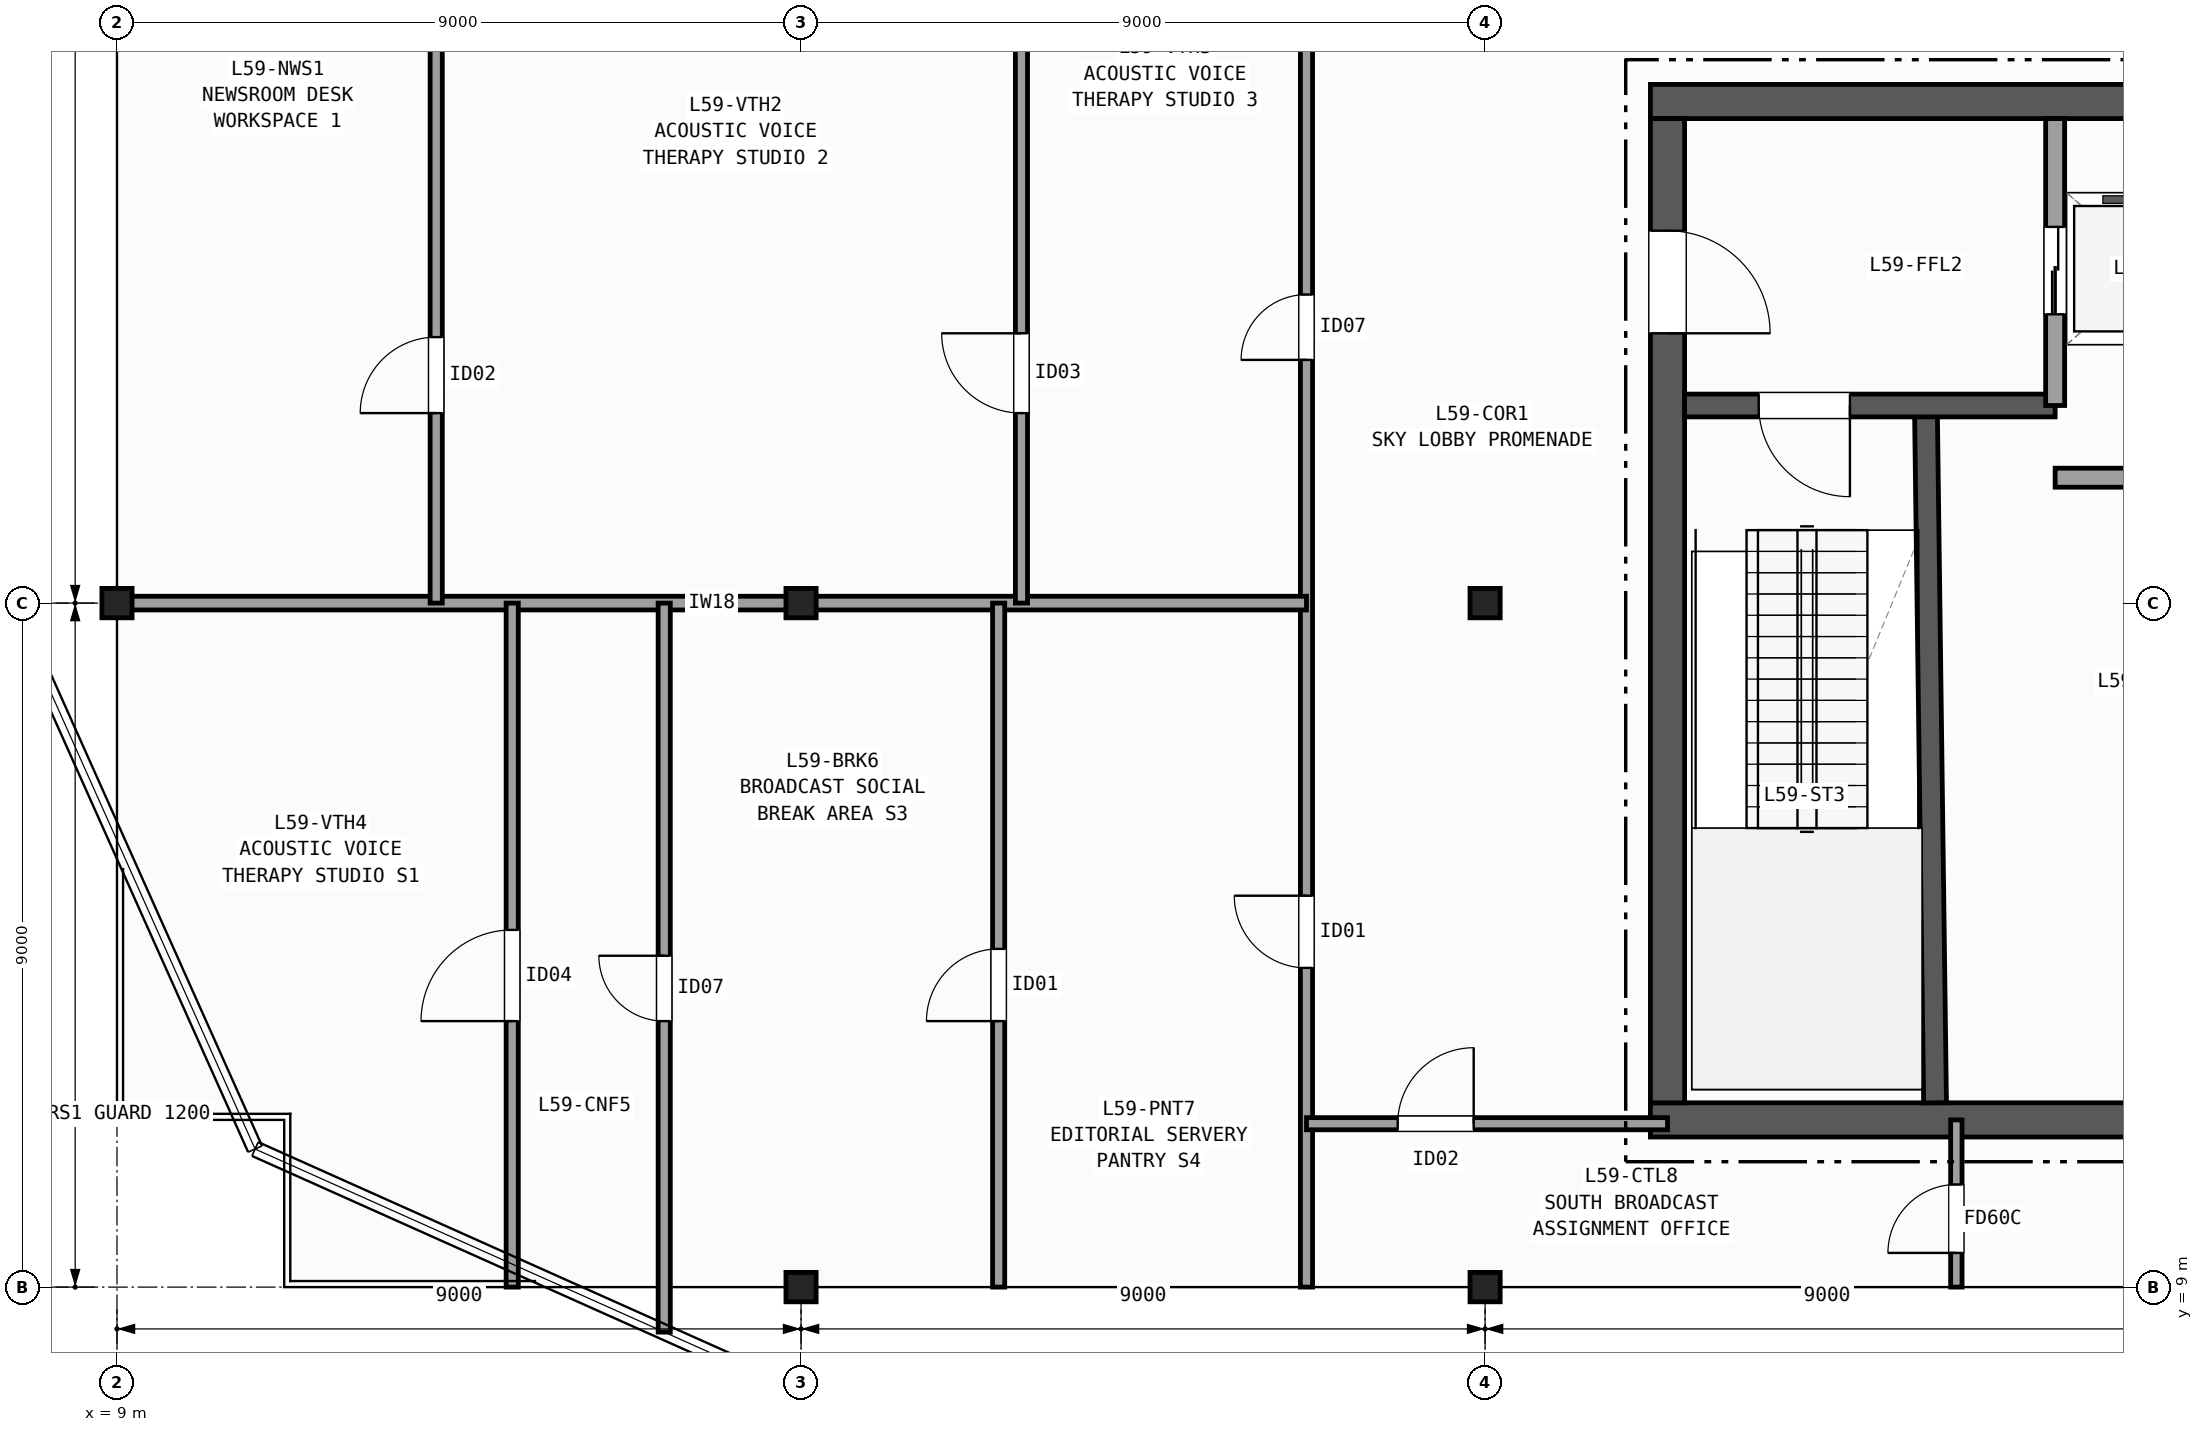
"""IFC4 building model, lengths in metres.
Left out: names, types, materials, properties, quantities, classifications, styles, units other than length and angle.
Written with IfcOpenShell. Run it as: python <this file> out.ifc"""

import sys

from ifc_helpers import new_model, si_unit, direction, frame, frame_2d, origin, origin_2d, place, context, subcontext, project, spatial, rectangle, i_section, extrude, element, fill, save


model = new_model("IFC4")
c1 = context("Model", 3, precision=1e-05, world=origin(), true_north=direction((0.0, 1.0)))
c2 = subcontext(c1, "Body", "Model", "MODEL_VIEW")
j1 = project(units=[si_unit("LENGTHUNIT", "METRE"), si_unit("PLANEANGLEUNIT", "RADIAN")], contexts=[c1])
p1 = place(None, origin())
s1 = spatial("IfcSite", under=j1, at=p1, CompositionType="ELEMENT")
p2 = place(p1, origin())
s2 = spatial("IfcBuilding", under=s1, at=p2, CompositionType="ELEMENT")
p3 = place(p2, frame((0.0, 0.0, 235.8)))
s3 = spatial("IfcBuildingStorey", under=s2, at=p3, CompositionType="ELEMENT", Elevation=235.8)
for number, where, z_axis, x_axis in (
    (1, (9.0, 18.0, 0.0), (0.0, 0.0, 1.0), (1.0, 0.0, 0.0)),
    (2, (18.0, 9.0, 0.0), (0.0, 0.0, 1.0), (1.0, 0.0, 0.0)),
    (3, (18.0, 18.0, 0.0), (0.0, 0.0, 1.0), (1.0, 0.0, 0.0)),
    (4, (27.0, 9.0, 0.0), (0.0, 0.0, 1.0), (1.0, 0.0, 0.0)),
    (5, (27.0, 18.0, 0.0), (0.0, 0.0, 1.0), (1.0, 0.0, 0.0)),
):
    element("IfcColumn", number, at=place(p3, frame(where, z_axis=z_axis, x_axis=x_axis)), inside=s3, PredefinedType="COLUMN", context=c2, shape_type="SweptSolid", body=[
        extrude(i_section(OverallWidth=0.397, OverallDepth=0.387, WebThickness=0.021, FlangeThickness=0.033, FilletRadius=0.015, at=origin_2d()), origin(), (0.0, 0.0, 1.0), 5.0),
    ])
p4 = place(p3, frame((29.175, 11.2, 0.0), z_axis=(0.0, 0.0, 1.0), x_axis=(1.0, 0.0, 0.0)))
e6 = element("IfcWall", 6, at=p4, inside=s3, PredefinedType="SHEAR", context=c2, shape_type="SweptSolid", body=[
    extrude(rectangle(XDim=13.85, YDim=0.45, at=frame_2d((6.925, 0.0))), origin(), (0.0, 0.0, 1.0), 4.72),
])
p5 = place(p3, frame((43.025, 24.6, 0.0), z_axis=(0.0, 0.0, 1.0), x_axis=(-1.0, 0.0, 0.0)))
e7 = element("IfcWall", 7, at=p5, inside=s3, PredefinedType="SHEAR", context=c2, shape_type="SweptSolid", body=[
    extrude(rectangle(XDim=13.85, YDim=0.45, at=frame_2d((6.925, 0.0))), origin(), (0.0, 0.0, 1.0), 4.72),
])
p6 = place(p5, frame((0.725, 0.0, 0.0)))
e8 = element("IfcOpeningElement", 8, at=p6, cuts=e7, PredefinedType="OPENING", context=c2, shape_type="SweptSolid", body=[
    extrude(rectangle(XDim=1.1, YDim=2.15, at=frame_2d((0.55, 1.075))), frame((0.0, 0.235, 0.0), z_axis=(0.0, -1.0, 0.0), x_axis=(1.0, 0.0, 0.0)), (0.0, 0.0, 1.0), 0.47),
])
p7 = place(p5, frame((2.675, 0.0, 0.0)))
e9 = element("IfcOpeningElement", 9, at=p7, cuts=e7, PredefinedType="OPENING", context=c2, shape_type="SweptSolid", body=[
    extrude(rectangle(XDim=0.9, YDim=2.1, at=frame_2d((0.45, 1.05))), frame((0.0, 0.235, 0.0), z_axis=(0.0, -1.0, 0.0), x_axis=(1.0, 0.0, 0.0)), (0.0, 0.0, 1.0), 0.47),
])
p8 = place(p5, frame((4.575, 0.0, 0.0)))
e10 = element("IfcOpeningElement", 10, at=p8, cuts=e7, PredefinedType="OPENING", context=c2, shape_type="SweptSolid", body=[
    extrude(rectangle(XDim=0.9, YDim=2.1, at=frame_2d((0.45, 1.05))), frame((0.0, 0.235, 0.0), z_axis=(0.0, -1.0, 0.0), x_axis=(1.0, 0.0, 0.0)), (0.0, 0.0, 1.0), 0.47),
])
p9 = place(p3, frame((29.4, 24.375, 0.0), z_axis=(0.0, 0.0, 1.0), x_axis=(0.0, -1.0, 0.0)))
e11 = element("IfcWall", 11, at=p9, inside=s3, PredefinedType="SHEAR", context=c2, shape_type="SweptSolid", body=[
    extrude(rectangle(XDim=12.95, YDim=0.45, at=frame_2d((6.475, 0.0))), origin(), (0.0, 0.0, 1.0), 4.72),
])
p10 = place(p9, frame((1.475, 0.0, 0.0)))
e12 = element("IfcOpeningElement", 12, at=p10, cuts=e11, PredefinedType="OPENING", context=c2, shape_type="SweptSolid", body=[
    extrude(rectangle(XDim=1.35, YDim=2.15, at=frame_2d((0.675, 1.075))), frame((0.0, 0.235, 0.0), z_axis=(0.0, -1.0, 0.0), x_axis=(1.0, 0.0, 0.0)), (0.0, 0.0, 1.0), 0.47),
])
p11 = place(p3, frame((32.92, 11.425, 0.0), z_axis=(0.0, 0.0, 1.0), x_axis=(-0.013135638869, 0.999913723774, 0.0)))
e13 = element("IfcWall", 13, at=p11, inside=s3, PredefinedType="SHEAR", context=c2, shape_type="SweptSolid", body=[
    extrude(rectangle(XDim=9.126, YDim=0.3, at=frame_2d((4.563, 0.0))), origin(), (0.0, 0.0, 1.0), 4.72),
])
p12 = place(p3, frame((34.5, 20.6, 0.0), z_axis=(0.0, 0.0, 1.0), x_axis=(-1.0, 0.0, 0.0)))
e14 = element("IfcWall", 14, at=p12, inside=s3, PredefinedType="SHEAR", context=c2, shape_type="SweptSolid", body=[
    extrude(rectangle(XDim=4.875, YDim=0.3, at=frame_2d((2.438, 0.0))), origin(), (0.0, 0.0, 1.0), 4.72),
])
p13 = place(p12, frame((2.7, 0.0, 0.0)))
e15 = element("IfcOpeningElement", 15, at=p13, cuts=e14, PredefinedType="OPENING", context=c2, shape_type="SweptSolid", body=[
    extrude(rectangle(XDim=1.2, YDim=2.15, at=frame_2d((0.6, 1.075))), frame((0.0, 0.16, 0.0), z_axis=(0.0, -1.0, 0.0), x_axis=(1.0, 0.0, 0.0)), (0.0, 0.0, 1.0), 0.32),
])
p14 = place(p3, frame((34.5, 20.6, 0.0), z_axis=(0.0, 0.0, 1.0), x_axis=(0.0, 1.0, 0.0)))
e16 = element("IfcWall", 16, at=p14, inside=s3, PredefinedType="PARTITIONING", context=c2, shape_type="SweptSolid", body=[
    extrude(rectangle(XDim=3.775, YDim=0.25, at=frame_2d((1.887, 0.0))), origin(), (0.0, 0.0, 1.0), 4.72),
])
p15 = place(p14, frame((1.2, 0.0, 0.0)))
e17 = element("IfcOpeningElement", 17, at=p15, cuts=e16, PredefinedType="OPENING", context=c2, shape_type="SweptSolid", body=[
    extrude(rectangle(XDim=1.15, YDim=2.15, at=frame_2d((0.575, 1.075))), frame((0.0, 0.135, 0.0), z_axis=(0.0, -1.0, 0.0), x_axis=(1.0, 0.0, 0.0)), (0.0, 0.0, 1.0), 0.27),
])
p16 = place(p3, frame((34.5, 19.65, 0.0), z_axis=(0.0, 0.0, 1.0), x_axis=(1.0, 0.0, 0.0)))
e18 = element("IfcWall", 18, at=p16, inside=s3, PredefinedType="PARTITIONING", context=c2, shape_type="SweptSolid", body=[
    extrude(rectangle(XDim=6.48, YDim=0.25, at=frame_2d((3.24, 0.0))), origin(), (0.0, 0.0, 1.0), 4.72),
])
p17 = place(p3, frame((24.65, 9.0, 0.0), z_axis=(0.0, 0.0, 1.0), x_axis=(0.0, 1.0, 0.0)))
e19 = element("IfcWall", 19, at=p17, inside=s3, PredefinedType="PARTITIONING", context=c2, shape_type="SweptSolid", body=[
    extrude(rectangle(XDim=19.2, YDim=0.16, at=frame_2d((9.6, 0.0))), origin(), (0.0, 0.0, 1.0), 4.007),
])
p18 = place(p17, frame((12.2, 0.0, 0.0)))
e20 = element("IfcOpeningElement", 20, at=p18, cuts=e19, PredefinedType="OPENING", context=c2, shape_type="SweptSolid", body=[
    extrude(rectangle(XDim=0.86, YDim=2.05, at=frame_2d((0.43, 1.025))), frame((0.0, 0.09, 0.0), z_axis=(0.0, -1.0, 0.0), x_axis=(1.0, 0.0, 0.0)), (0.0, 0.0, 1.0), 0.18),
])
p19 = place(p17, frame((4.2, 0.0, 0.0)))
e21 = element("IfcOpeningElement", 21, at=p19, cuts=e19, PredefinedType="OPENING", context=c2, shape_type="SweptSolid", body=[
    extrude(rectangle(XDim=0.95, YDim=2.1, at=frame_2d((0.475, 1.05))), frame((0.0, 0.09, 0.0), z_axis=(0.0, -1.0, 0.0), x_axis=(1.0, 0.0, 0.0)), (0.0, 0.0, 1.0), 0.18),
])
p20 = place(p3, frame((9.0, 18.0, 0.0), z_axis=(0.0, 0.0, 1.0), x_axis=(1.0, 0.0, 0.0)))
e22 = element("IfcWall", 22, at=p20, inside=s3, PredefinedType="PARTITIONING", context=c2, shape_type="SweptSolid", body=[
    extrude(rectangle(XDim=15.65, YDim=0.18, at=frame_2d((7.825, 0.0))), origin(), (0.0, 0.0, 1.0), 4.007),
])
p21 = place(p3, frame((13.2, 18.0, 0.0), z_axis=(0.0, 0.0, 1.0), x_axis=(0.0, 1.0, 0.0)))
e23 = element("IfcWall", 23, at=p21, inside=s3, PredefinedType="PARTITIONING", context=c2, shape_type="SweptSolid", body=[
    extrude(rectangle(XDim=10.13, YDim=0.16, at=frame_2d((5.065, 0.0))), origin(), (0.0, 0.0, 1.0), 4.089),
])
p22 = place(p21, frame((2.5, 0.0, 0.0)))
e24 = element("IfcOpeningElement", 24, at=p22, cuts=e23, PredefinedType="OPENING", context=c2, shape_type="SweptSolid", body=[
    extrude(rectangle(XDim=1.0, YDim=2.1, at=frame_2d((0.5, 1.05))), frame((0.0, 0.09, 0.0), z_axis=(0.0, -1.0, 0.0), x_axis=(1.0, 0.0, 0.0)), (0.0, 0.0, 1.0), 0.18),
])
p23 = place(p3, frame((20.9, 18.0, 0.0), z_axis=(0.0, 0.0, 1.0), x_axis=(0.0, 1.0, 0.0)))
e25 = element("IfcWall", 25, at=p23, inside=s3, PredefinedType="PARTITIONING", context=c2, shape_type="SweptSolid", body=[
    extrude(rectangle(XDim=10.13, YDim=0.16, at=frame_2d((5.065, 0.0))), origin(), (0.0, 0.0, 1.0), 4.089),
])
p24 = place(p23, frame((2.5, 0.0, 0.0)))
e26 = element("IfcOpeningElement", 26, at=p24, cuts=e25, PredefinedType="OPENING", context=c2, shape_type="SweptSolid", body=[
    extrude(rectangle(XDim=1.05, YDim=2.15, at=frame_2d((0.525, 1.075))), frame((0.0, 0.09, 0.0), z_axis=(0.0, -1.0, 0.0), x_axis=(1.0, 0.0, 0.0)), (0.0, 0.0, 1.0), 0.18),
])
p25 = place(p3, frame((14.2, 9.0, 0.0), z_axis=(0.0, 0.0, 1.0), x_axis=(0.0, 1.0, 0.0)))
e27 = element("IfcWall", 27, at=p25, inside=s3, PredefinedType="PARTITIONING", context=c2, shape_type="SweptSolid", body=[
    extrude(rectangle(XDim=9.0, YDim=0.16, at=frame_2d((4.5, 0.0))), origin(), (0.0, 0.0, 1.0), 4.089),
])
p26 = place(p25, frame((3.5, 0.0, 0.0)))
e28 = element("IfcOpeningElement", 28, at=p26, cuts=e27, PredefinedType="OPENING", context=c2, shape_type="SweptSolid", body=[
    extrude(rectangle(XDim=1.2, YDim=2.15, at=frame_2d((0.6, 1.075))), frame((0.0, 0.09, 0.0), z_axis=(0.0, -1.0, 0.0), x_axis=(1.0, 0.0, 0.0)), (0.0, 0.0, 1.0), 0.18),
])
p27 = place(p3, frame((16.2, 8.408, 0.0), z_axis=(0.0, 0.0, 1.0), x_axis=(0.0, 1.0, 0.0)))
e29 = element("IfcWall", 29, at=p27, inside=s3, PredefinedType="PARTITIONING", context=c2, shape_type="SweptSolid", body=[
    extrude(rectangle(XDim=9.592, YDim=0.16, at=frame_2d((4.796, 0.0))), origin(), (0.0, 0.0, 1.0), 4.089),
])
p28 = place(p27, frame((4.092, 0.0, 0.0)))
e30 = element("IfcOpeningElement", 30, at=p28, cuts=e29, PredefinedType="OPENING", context=c2, shape_type="SweptSolid", body=[
    extrude(rectangle(XDim=0.86, YDim=2.05, at=frame_2d((0.43, 1.025))), frame((0.0, 0.09, 0.0), z_axis=(0.0, -1.0, 0.0), x_axis=(1.0, 0.0, 0.0)), (0.0, 0.0, 1.0), 0.18),
])
p29 = place(p3, frame((20.6, 9.0, 0.0), z_axis=(0.0, 0.0, 1.0), x_axis=(0.0, 1.0, 0.0)))
e31 = element("IfcWall", 31, at=p29, inside=s3, PredefinedType="PARTITIONING", context=c2, shape_type="SweptSolid", body=[
    extrude(rectangle(XDim=9.0, YDim=0.16, at=frame_2d((4.5, 0.0))), origin(), (0.0, 0.0, 1.0), 4.007),
])
p30 = place(p29, frame((3.5, 0.0, 0.0)))
e32 = element("IfcOpeningElement", 32, at=p30, cuts=e31, PredefinedType="OPENING", context=c2, shape_type="SweptSolid", body=[
    extrude(rectangle(XDim=0.95, YDim=2.1, at=frame_2d((0.475, 1.05))), frame((0.0, 0.09, 0.0), z_axis=(0.0, -1.0, 0.0), x_axis=(1.0, 0.0, 0.0)), (0.0, 0.0, 1.0), 0.18),
])
p31 = place(p3, frame((24.65, 11.15, 0.0), z_axis=(0.0, 0.0, 1.0), x_axis=(1.0, 0.0, 0.0)))
e33 = element("IfcWall", 33, at=p31, inside=s3, PredefinedType="PARTITIONING", context=c2, shape_type="SweptSolid", body=[
    extrude(rectangle(XDim=4.75, YDim=0.16, at=frame_2d((2.375, 0.0))), origin(), (0.0, 0.0, 1.0), 4.092),
])
p32 = place(p31, frame((1.2, 0.0, 0.0)))
e34 = element("IfcOpeningElement", 34, at=p32, cuts=e33, PredefinedType="OPENING", context=c2, shape_type="SweptSolid", body=[
    extrude(rectangle(XDim=1.0, YDim=2.1, at=frame_2d((0.5, 1.05))), frame((0.0, 0.09, 0.0), z_axis=(0.0, -1.0, 0.0), x_axis=(1.0, 0.0, 0.0)), (0.0, 0.0, 1.0), 0.18),
])
p33 = place(p3, frame((33.2, 9.0, 0.0), z_axis=(0.0, 0.0, 1.0), x_axis=(0.0, 1.0, 0.0)))
e35 = element("IfcWall", 35, at=p33, inside=s3, PredefinedType="PARTITIONING", context=c2, shape_type="SweptSolid", body=[
    extrude(rectangle(XDim=2.2, YDim=0.15, at=frame_2d((1.1, 0.0))), origin(), (0.0, 0.0, 1.0), 4.007),
])
p34 = place(p33, frame((0.45, 0.0, 0.0)))
e36 = element("IfcOpeningElement", 36, at=p34, cuts=e35, PredefinedType="OPENING", context=c2, shape_type="SweptSolid", body=[
    extrude(rectangle(XDim=0.9, YDim=2.1, at=frame_2d((0.45, 1.05))), frame((0.0, 0.085, 0.0), z_axis=(0.0, -1.0, 0.0), x_axis=(1.0, 0.0, 0.0)), (0.0, 0.0, 1.0), 0.17),
])
p35 = place(p13, origin())
e37 = element("IfcDoor", 37, at=p35, inside=s3, OperationType="SINGLE_SWING_LEFT", PredefinedType="DOOR", context=c2, shape_type="SweptSolid", body=[
    extrude(rectangle(XDim=1.2, YDim=2.15, at=frame_2d((0.6, 1.075))), frame((0.0, 0.025, 0.0), z_axis=(0.0, -1.0, 0.0), x_axis=(1.0, 0.0, 0.0)), (0.0, 0.0, 1.0), 0.05),
])
fill(e15, e37)
p36 = place(p10, origin())
e38 = element("IfcDoor", 38, at=p36, inside=s3, OperationType="SINGLE_SWING_RIGHT", PredefinedType="DOOR", context=c2, shape_type="SweptSolid", body=[
    extrude(rectangle(XDim=1.35, YDim=2.15, at=frame_2d((0.675, 1.075))), frame((0.0, 0.025, 0.0), z_axis=(0.0, -1.0, 0.0), x_axis=(1.0, 0.0, 0.0)), (0.0, 0.0, 1.0), 0.05),
])
fill(e12, e38)
p37 = place(p15, origin())
e39 = element("IfcDoor", 39, at=p37, inside=s3, OperationType="DOUBLE_DOOR_SLIDING", PredefinedType="DOOR", context=c2, shape_type="SweptSolid", body=[
    extrude(rectangle(XDim=1.15, YDim=2.15, at=frame_2d((0.575, 1.075))), frame((0.0, 0.025, 0.0), z_axis=(0.0, -1.0, 0.0), x_axis=(1.0, 0.0, 0.0)), (0.0, 0.0, 1.0), 0.05),
])
fill(e17, e39)
p38 = place(p18, origin())
e40 = element("IfcDoor", 40, at=p38, inside=s3, OperationType="SINGLE_SWING_LEFT", PredefinedType="DOOR", context=c2, shape_type="SweptSolid", body=[
    extrude(rectangle(XDim=0.86, YDim=2.05, at=frame_2d((0.43, 1.025))), frame((0.0, 0.025, 0.0), z_axis=(0.0, -1.0, 0.0), x_axis=(1.0, 0.0, 0.0)), (0.0, 0.0, 1.0), 0.05),
])
fill(e20, e40)
p39 = place(p19, origin())
e41 = element("IfcDoor", 41, at=p39, inside=s3, OperationType="SINGLE_SWING_RIGHT", PredefinedType="DOOR", context=c2, shape_type="SweptSolid", body=[
    extrude(rectangle(XDim=0.95, YDim=2.1, at=frame_2d((0.475, 1.05))), frame((0.0, 0.025, 0.0), z_axis=(0.0, -1.0, 0.0), x_axis=(1.0, 0.0, 0.0)), (0.0, 0.0, 1.0), 0.05),
])
fill(e21, e41)
p40 = place(p22, origin())
e42 = element("IfcDoor", 42, at=p40, inside=s3, OperationType="SINGLE_SWING_LEFT", PredefinedType="DOOR", context=c2, shape_type="SweptSolid", body=[
    extrude(rectangle(XDim=1.0, YDim=2.1, at=frame_2d((0.5, 1.05))), frame((0.0, 0.025, 0.0), z_axis=(0.0, -1.0, 0.0), x_axis=(1.0, 0.0, 0.0)), (0.0, 0.0, 1.0), 0.05),
])
fill(e24, e42)
p41 = place(p24, origin())
e43 = element("IfcDoor", 43, at=p41, inside=s3, OperationType="SINGLE_SWING_RIGHT", PredefinedType="DOOR", context=c2, shape_type="SweptSolid", body=[
    extrude(rectangle(XDim=1.05, YDim=2.15, at=frame_2d((0.525, 1.075))), frame((0.0, 0.025, 0.0), z_axis=(0.0, -1.0, 0.0), x_axis=(1.0, 0.0, 0.0)), (0.0, 0.0, 1.0), 0.05),
])
fill(e26, e43)
p42 = place(p26, origin())
e44 = element("IfcDoor", 44, at=p42, inside=s3, OperationType="SINGLE_SWING_LEFT", PredefinedType="DOOR", context=c2, shape_type="SweptSolid", body=[
    extrude(rectangle(XDim=1.2, YDim=2.15, at=frame_2d((0.6, 1.075))), frame((0.0, 0.025, 0.0), z_axis=(0.0, -1.0, 0.0), x_axis=(1.0, 0.0, 0.0)), (0.0, 0.0, 1.0), 0.05),
])
fill(e28, e44)
p43 = place(p28, origin())
e45 = element("IfcDoor", 45, at=p43, inside=s3, OperationType="SINGLE_SWING_RIGHT", PredefinedType="DOOR", context=c2, shape_type="SweptSolid", body=[
    extrude(rectangle(XDim=0.86, YDim=2.05, at=frame_2d((0.43, 1.025))), frame((0.0, 0.025, 0.0), z_axis=(0.0, -1.0, 0.0), x_axis=(1.0, 0.0, 0.0)), (0.0, 0.0, 1.0), 0.05),
])
fill(e30, e45)
p44 = place(p30, origin())
e46 = element("IfcDoor", 46, at=p44, inside=s3, OperationType="SINGLE_SWING_LEFT", PredefinedType="DOOR", context=c2, shape_type="SweptSolid", body=[
    extrude(rectangle(XDim=0.95, YDim=2.1, at=frame_2d((0.475, 1.05))), frame((0.0, 0.025, 0.0), z_axis=(0.0, -1.0, 0.0), x_axis=(1.0, 0.0, 0.0)), (0.0, 0.0, 1.0), 0.05),
])
fill(e32, e46)
p45 = place(p32, origin())
e47 = element("IfcDoor", 47, at=p45, inside=s3, OperationType="SINGLE_SWING_RIGHT", PredefinedType="DOOR", context=c2, shape_type="SweptSolid", body=[
    extrude(rectangle(XDim=1.0, YDim=2.1, at=frame_2d((0.5, 1.05))), frame((0.0, 0.025, 0.0), z_axis=(0.0, -1.0, 0.0), x_axis=(1.0, 0.0, 0.0)), (0.0, 0.0, 1.0), 0.05),
])
fill(e34, e47)
p46 = place(p34, origin())
e48 = element("IfcDoor", 48, at=p46, inside=s3, OperationType="SINGLE_SWING_LEFT", PredefinedType="DOOR", context=c2, shape_type="SweptSolid", body=[
    extrude(rectangle(XDim=0.9, YDim=2.1, at=frame_2d((0.45, 1.05))), frame((0.0, 0.025, 0.0), z_axis=(0.0, -1.0, 0.0), x_axis=(1.0, 0.0, 0.0)), (0.0, 0.0, 1.0), 0.05),
])
fill(e36, e48)
save(model, sys.argv[1])
